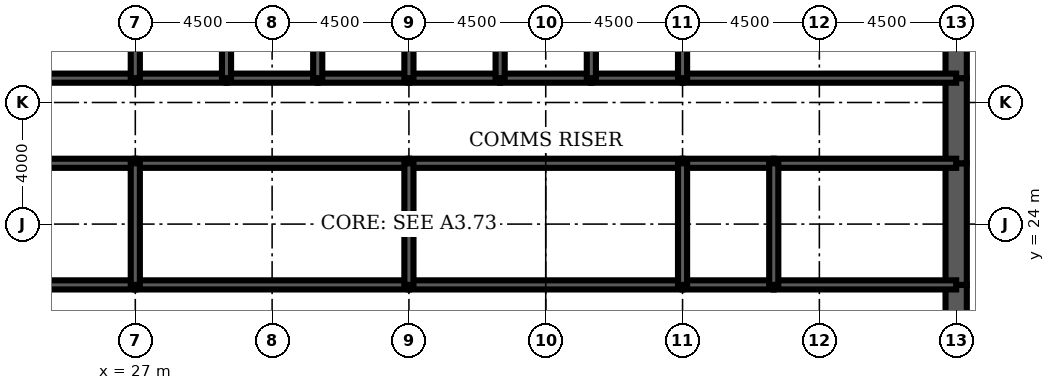
"""IFC4 building model, lengths in metres.
Left out: names, types, materials, properties, quantities, classifications, styles, units other than length and angle.
Written with IfcOpenShell. Run it as: python <this file> out.ifc"""

import sys

from ifc_helpers import new_model, si_unit, direction, frame, frame_2d, origin, place, context, subcontext, project, spatial, rectangle, extrude, element, fill, save


model = new_model("IFC4")
c1 = context("Model", 3, precision=1e-05, world=origin(), true_north=direction((0.0, 1.0)))
c2 = subcontext(c1, "Body", "Model", "MODEL_VIEW")
j1 = project(units=[si_unit("LENGTHUNIT", "METRE"), si_unit("PLANEANGLEUNIT", "RADIAN")], contexts=[c1])
p1 = place(None, origin())
s1 = spatial("IfcSite", under=j1, at=p1, CompositionType="ELEMENT")
p2 = place(p1, origin())
s2 = spatial("IfcBuilding", under=s1, at=p2, CompositionType="ELEMENT")
p3 = place(p2, frame((0.0, 0.0, 313.1)))
s3 = spatial("IfcBuildingStorey", under=s2, at=p3, CompositionType="ELEMENT", Elevation=313.1)
p4 = place(p3, frame((54.0, 19.2, 0.0), z_axis=(0.0, 0.0, 1.0), x_axis=(0.0, 1.0, 0.0)))
e1 = element("IfcWall", 1, at=p4, inside=s3, PredefinedType="SHEAR", context=c2, shape_type="SweptSolid", body=[
    extrude(rectangle(XDim=2.8, YDim=0.7, at=frame_2d((1.4, 0.0))), origin(), (0.0, 0.0, 1.0), 4.2),
])
p5 = place(p4, frame((0.4, 0.0, 0.0)))
e2 = element("IfcOpeningElement", 2, at=p5, cuts=e1, PredefinedType="OPENING", context=c2, shape_type="SweptSolid", body=[
    extrude(rectangle(XDim=1.8, YDim=2.1, at=frame_2d((0.9, 1.05))), frame((0.0, 0.36, 0.0), z_axis=(0.0, -1.0, 0.0), x_axis=(1.0, 0.0, 0.0)), (0.0, 0.0, 1.0), 0.72),
])
p6 = place(p3, frame((54.0, 22.0, 0.0), z_axis=(0.0, 0.0, 1.0), x_axis=(0.0, 1.0, 0.0)))
e3 = element("IfcWall", 3, at=p6, inside=s3, PredefinedType="SHEAR", context=c2, shape_type="SweptSolid", body=[
    extrude(rectangle(XDim=4.0, YDim=0.7, at=frame_2d((2.0, 0.0))), origin(), (0.0, 0.0, 1.0), 4.2),
])
p7 = place(p3, frame((54.0, 26.0, 0.0), z_axis=(0.0, 0.0, 1.0), x_axis=(0.0, 1.0, 0.0)))
e4 = element("IfcWall", 4, at=p7, inside=s3, PredefinedType="SHEAR", context=c2, shape_type="SweptSolid", body=[
    extrude(rectangle(XDim=2.8, YDim=0.7, at=frame_2d((1.4, 0.0))), origin(), (0.0, 0.0, 1.0), 4.2),
])
p8 = place(p7, frame((0.6, 0.0, 0.0)))
e5 = element("IfcOpeningElement", 5, at=p8, cuts=e4, PredefinedType="OPENING", context=c2, shape_type="SweptSolid", body=[
    extrude(rectangle(XDim=1.8, YDim=2.1, at=frame_2d((0.9, 1.05))), frame((0.0, 0.36, 0.0), z_axis=(0.0, -1.0, 0.0), x_axis=(1.0, 0.0, 0.0)), (0.0, 0.0, 1.0), 0.72),
])
p9 = place(p3, frame((54.0, 28.8, 0.0), z_axis=(0.0, 0.0, 1.0), x_axis=(0.0, 1.0, 0.0)))
e6 = element("IfcWall", 6, at=p9, inside=s3, PredefinedType="SHEAR", context=c2, shape_type="SweptSolid", body=[
    extrude(rectangle(XDim=3.2, YDim=0.7, at=frame_2d((1.6, 0.0))), origin(), (0.0, 0.0, 1.0), 4.2),
])
p10 = place(p3, frame((18.0, 28.8, 0.0), z_axis=(0.0, 0.0, 1.0), x_axis=(1.0, 0.0, 0.0)))
e7 = element("IfcWall", 7, at=p10, inside=s3, PredefinedType="SOLIDWALL", context=c2, shape_type="SweptSolid", body=[
    extrude(rectangle(XDim=9.0, YDim=0.3, at=frame_2d((4.5, 0.0))), origin(), (0.0, 0.0, 1.0), 4.2),
])
p11 = place(p10, frame((0.65, 0.0, 0.0)))
e8 = element("IfcOpeningElement", 8, at=p11, cuts=e7, PredefinedType="OPENING", context=c2, shape_type="SweptSolid", body=[
    extrude(rectangle(XDim=1.0, YDim=2.1, at=frame_2d((0.5, 1.05))), frame((0.0, 0.16, 0.0), z_axis=(0.0, -1.0, 0.0), x_axis=(1.0, 0.0, 0.0)), (0.0, 0.0, 1.0), 0.32),
])
p12 = place(p3, frame((27.0, 28.8, 0.0), z_axis=(0.0, 0.0, 1.0), x_axis=(1.0, 0.0, 0.0)))
e9 = element("IfcWall", 9, at=p12, inside=s3, PredefinedType="SOLIDWALL", context=c2, shape_type="SweptSolid", body=[
    extrude(rectangle(XDim=3.0, YDim=0.3, at=frame_2d((1.5, 0.0))), origin(), (0.0, 0.0, 1.0), 4.2),
])
p13 = place(p12, frame((0.95, 0.0, 0.0)))
e10 = element("IfcOpeningElement", 10, at=p13, cuts=e9, PredefinedType="OPENING", context=c2, shape_type="SweptSolid", body=[
    extrude(rectangle(XDim=1.1, YDim=2.2, at=frame_2d((0.55, 1.1))), frame((0.0, 0.16, 0.0), z_axis=(0.0, -1.0, 0.0), x_axis=(1.0, 0.0, 0.0)), (0.0, 0.0, 1.0), 0.32),
])
p14 = place(p3, frame((30.0, 28.8, 0.0), z_axis=(0.0, 0.0, 1.0), x_axis=(1.0, 0.0, 0.0)))
e11 = element("IfcWall", 11, at=p14, inside=s3, PredefinedType="SOLIDWALL", context=c2, shape_type="SweptSolid", body=[
    extrude(rectangle(XDim=3.0, YDim=0.3, at=frame_2d((1.5, 0.0))), origin(), (0.0, 0.0, 1.0), 4.2),
])
p15 = place(p14, frame((0.95, 0.0, 0.0)))
e12 = element("IfcOpeningElement", 12, at=p15, cuts=e11, PredefinedType="OPENING", context=c2, shape_type="SweptSolid", body=[
    extrude(rectangle(XDim=1.1, YDim=2.2, at=frame_2d((0.55, 1.1))), frame((0.0, 0.16, 0.0), z_axis=(0.0, -1.0, 0.0), x_axis=(1.0, 0.0, 0.0)), (0.0, 0.0, 1.0), 0.32),
])
p16 = place(p3, frame((33.0, 28.8, 0.0), z_axis=(0.0, 0.0, 1.0), x_axis=(1.0, 0.0, 0.0)))
e13 = element("IfcWall", 13, at=p16, inside=s3, PredefinedType="SOLIDWALL", context=c2, shape_type="SweptSolid", body=[
    extrude(rectangle(XDim=3.0, YDim=0.3, at=frame_2d((1.5, 0.0))), origin(), (0.0, 0.0, 1.0), 4.2),
])
p17 = place(p16, frame((0.95, 0.0, 0.0)))
e14 = element("IfcOpeningElement", 14, at=p17, cuts=e13, PredefinedType="OPENING", context=c2, shape_type="SweptSolid", body=[
    extrude(rectangle(XDim=1.1, YDim=2.2, at=frame_2d((0.55, 1.1))), frame((0.0, 0.16, 0.0), z_axis=(0.0, -1.0, 0.0), x_axis=(1.0, 0.0, 0.0)), (0.0, 0.0, 1.0), 0.32),
])
p18 = place(p3, frame((36.0, 28.8, 0.0), z_axis=(0.0, 0.0, 1.0), x_axis=(1.0, 0.0, 0.0)))
e15 = element("IfcWall", 15, at=p18, inside=s3, PredefinedType="SOLIDWALL", context=c2, shape_type="SweptSolid", body=[
    extrude(rectangle(XDim=3.0, YDim=0.3, at=frame_2d((1.5, 0.0))), origin(), (0.0, 0.0, 1.0), 4.2),
])
p19 = place(p18, frame((1.0, 0.0, 0.0)))
e16 = element("IfcOpeningElement", 16, at=p19, cuts=e15, PredefinedType="OPENING", context=c2, shape_type="SweptSolid", body=[
    extrude(rectangle(XDim=1.0, YDim=2.1, at=frame_2d((0.5, 1.05))), frame((0.0, 0.16, 0.0), z_axis=(0.0, -1.0, 0.0), x_axis=(1.0, 0.0, 0.0)), (0.0, 0.0, 1.0), 0.32),
])
p20 = place(p3, frame((39.0, 28.8, 0.0), z_axis=(0.0, 0.0, 1.0), x_axis=(1.0, 0.0, 0.0)))
e17 = element("IfcWall", 17, at=p20, inside=s3, PredefinedType="SOLIDWALL", context=c2, shape_type="SweptSolid", body=[
    extrude(rectangle(XDim=3.0, YDim=0.3, at=frame_2d((1.5, 0.0))), origin(), (0.0, 0.0, 1.0), 4.2),
])
p21 = place(p20, frame((1.0, 0.0, 0.0)))
e18 = element("IfcOpeningElement", 18, at=p21, cuts=e17, PredefinedType="OPENING", context=c2, shape_type="SweptSolid", body=[
    extrude(rectangle(XDim=1.0, YDim=2.1, at=frame_2d((0.5, 1.05))), frame((0.0, 0.16, 0.0), z_axis=(0.0, -1.0, 0.0), x_axis=(1.0, 0.0, 0.0)), (0.0, 0.0, 1.0), 0.32),
])
p22 = place(p3, frame((42.0, 28.8, 0.0), z_axis=(0.0, 0.0, 1.0), x_axis=(1.0, 0.0, 0.0)))
e19 = element("IfcWall", 19, at=p22, inside=s3, PredefinedType="SOLIDWALL", context=c2, shape_type="SweptSolid", body=[
    extrude(rectangle(XDim=3.0, YDim=0.3, at=frame_2d((1.5, 0.0))), origin(), (0.0, 0.0, 1.0), 4.2),
])
p23 = place(p22, frame((0.95, 0.0, 0.0)))
e20 = element("IfcOpeningElement", 20, at=p23, cuts=e19, PredefinedType="OPENING", context=c2, shape_type="SweptSolid", body=[
    extrude(rectangle(XDim=1.1, YDim=2.2, at=frame_2d((0.55, 1.1))), frame((0.0, 0.16, 0.0), z_axis=(0.0, -1.0, 0.0), x_axis=(1.0, 0.0, 0.0)), (0.0, 0.0, 1.0), 0.32),
])
p24 = place(p3, frame((45.0, 28.8, 0.0), z_axis=(0.0, 0.0, 1.0), x_axis=(1.0, 0.0, 0.0)))
e21 = element("IfcWall", 21, at=p24, inside=s3, PredefinedType="SOLIDWALL", context=c2, shape_type="SweptSolid", body=[
    extrude(rectangle(XDim=9.0, YDim=0.3, at=frame_2d((4.5, 0.0))), origin(), (0.0, 0.0, 1.0), 4.2),
])
p25 = place(p24, frame((7.35, 0.0, 0.0)))
e22 = element("IfcOpeningElement", 22, at=p25, cuts=e21, PredefinedType="OPENING", context=c2, shape_type="SweptSolid", body=[
    extrude(rectangle(XDim=1.0, YDim=2.1, at=frame_2d((0.5, 1.05))), frame((0.0, 0.16, 0.0), z_axis=(0.0, -1.0, 0.0), x_axis=(1.0, 0.0, 0.0)), (0.0, 0.0, 1.0), 0.32),
])
p26 = place(p3, frame((24.0, 22.0, 0.0), z_axis=(0.0, 0.0, 1.0), x_axis=(1.0, 0.0, 0.0)))
e23 = element("IfcWall", 23, at=p26, inside=s3, PredefinedType="SOLIDWALL", context=c2, shape_type="SweptSolid", body=[
    extrude(rectangle(XDim=3.0, YDim=0.3, at=frame_2d((1.5, 0.0))), origin(), (0.0, 0.0, 1.0), 4.2),
])
p27 = place(p26, frame((1.0, 0.0, 0.0)))
e24 = element("IfcOpeningElement", 24, at=p27, cuts=e23, PredefinedType="OPENING", context=c2, shape_type="SweptSolid", body=[
    extrude(rectangle(XDim=1.0, YDim=2.1, at=frame_2d((0.5, 1.05))), frame((0.0, 0.16, 0.0), z_axis=(0.0, -1.0, 0.0), x_axis=(1.0, 0.0, 0.0)), (0.0, 0.0, 1.0), 0.32),
])
p28 = place(p3, frame((27.0, 22.0, 0.0), z_axis=(0.0, 0.0, 1.0), x_axis=(1.0, 0.0, 0.0)))
e25 = element("IfcWall", 25, at=p28, inside=s3, PredefinedType="SOLIDWALL", context=c2, shape_type="SweptSolid", body=[
    extrude(rectangle(XDim=9.0, YDim=0.3, at=frame_2d((4.5, 0.0))), origin(), (0.0, 0.0, 1.0), 4.2),
])
p29 = place(p28, frame((4.0, 0.0, 0.0)))
e26 = element("IfcOpeningElement", 26, at=p29, cuts=e25, PredefinedType="OPENING", context=c2, shape_type="SweptSolid", body=[
    extrude(rectangle(XDim=1.0, YDim=2.1, at=frame_2d((0.5, 1.05))), frame((0.0, 0.16, 0.0), z_axis=(0.0, -1.0, 0.0), x_axis=(1.0, 0.0, 0.0)), (0.0, 0.0, 1.0), 0.32),
])
p30 = place(p3, frame((36.0, 22.0, 0.0), z_axis=(0.0, 0.0, 1.0), x_axis=(1.0, 0.0, 0.0)))
e27 = element("IfcWall", 27, at=p30, inside=s3, PredefinedType="SOLIDWALL", context=c2, shape_type="SweptSolid", body=[
    extrude(rectangle(XDim=9.0, YDim=0.3, at=frame_2d((4.5, 0.0))), origin(), (0.0, 0.0, 1.0), 4.2),
])
p31 = place(p30, frame((4.0, 0.0, 0.0)))
e28 = element("IfcOpeningElement", 28, at=p31, cuts=e27, PredefinedType="OPENING", context=c2, shape_type="SweptSolid", body=[
    extrude(rectangle(XDim=1.0, YDim=2.1, at=frame_2d((0.5, 1.05))), frame((0.0, 0.16, 0.0), z_axis=(0.0, -1.0, 0.0), x_axis=(1.0, 0.0, 0.0)), (0.0, 0.0, 1.0), 0.32),
])
p32 = place(p3, frame((45.0, 22.0, 0.0), z_axis=(0.0, 0.0, 1.0), x_axis=(1.0, 0.0, 0.0)))
e29 = element("IfcWall", 29, at=p32, inside=s3, PredefinedType="SOLIDWALL", context=c2, shape_type="SweptSolid", body=[
    extrude(rectangle(XDim=3.0, YDim=0.3, at=frame_2d((1.5, 0.0))), origin(), (0.0, 0.0, 1.0), 4.2),
])
p33 = place(p32, frame((1.0, 0.0, 0.0)))
e30 = element("IfcOpeningElement", 30, at=p33, cuts=e29, PredefinedType="OPENING", context=c2, shape_type="SweptSolid", body=[
    extrude(rectangle(XDim=1.0, YDim=2.1, at=frame_2d((0.5, 1.05))), frame((0.0, 0.16, 0.0), z_axis=(0.0, -1.0, 0.0), x_axis=(1.0, 0.0, 0.0)), (0.0, 0.0, 1.0), 0.32),
])
p34 = place(p3, frame((48.0, 22.0, 0.0), z_axis=(0.0, 0.0, 1.0), x_axis=(1.0, 0.0, 0.0)))
e31 = element("IfcWall", 31, at=p34, inside=s3, PredefinedType="SOLIDWALL", context=c2, shape_type="SweptSolid", body=[
    extrude(rectangle(XDim=6.0, YDim=0.3, at=frame_2d((3.0, 0.0))), origin(), (0.0, 0.0, 1.0), 4.2),
])
p35 = place(p34, frame((2.0, 0.0, 0.0)))
e32 = element("IfcOpeningElement", 32, at=p35, cuts=e31, PredefinedType="OPENING", context=c2, shape_type="SweptSolid", body=[
    extrude(rectangle(XDim=1.0, YDim=2.1, at=frame_2d((0.5, 1.05))), frame((0.0, 0.16, 0.0), z_axis=(0.0, -1.0, 0.0), x_axis=(1.0, 0.0, 0.0)), (0.0, 0.0, 1.0), 0.32),
])
p36 = place(p34, frame((4.25, 0.0, 0.0)))
e33 = element("IfcOpeningElement", 33, at=p36, cuts=e31, PredefinedType="OPENING", context=c2, shape_type="SweptSolid", body=[
    extrude(rectangle(XDim=1.0, YDim=2.1, at=frame_2d((0.5, 1.05))), frame((0.0, 0.16, 0.0), z_axis=(0.0, -1.0, 0.0), x_axis=(1.0, 0.0, 0.0)), (0.0, 0.0, 1.0), 0.32),
])
p37 = place(p3, frame((24.0, 26.0, 0.0), z_axis=(0.0, 0.0, 1.0), x_axis=(1.0, 0.0, 0.0)))
e34 = element("IfcWall", 34, at=p37, inside=s3, PredefinedType="SOLIDWALL", context=c2, shape_type="SweptSolid", body=[
    extrude(rectangle(XDim=3.0, YDim=0.3, at=frame_2d((1.5, 0.0))), origin(), (0.0, 0.0, 1.0), 4.2),
])
for number, where, z_axis, x_axis in (
    (35, (27.0, 26.0, 0.0), (0.0, 0.0, 1.0), (1.0, 0.0, 0.0)),
    (36, (36.0, 26.0, 0.0), (0.0, 0.0, 1.0), (1.0, 0.0, 0.0)),
):
    element("IfcWall", number, at=place(p3, frame(where, z_axis=z_axis, x_axis=x_axis)), inside=s3, PredefinedType="SOLIDWALL", context=c2, shape_type="SweptSolid", body=[
        extrude(rectangle(XDim=9.0, YDim=0.3, at=frame_2d((4.5, 0.0))), origin(), (0.0, 0.0, 1.0), 4.2),
    ])
p38 = place(p3, frame((45.0, 26.0, 0.0), z_axis=(0.0, 0.0, 1.0), x_axis=(1.0, 0.0, 0.0)))
e37 = element("IfcWall", 37, at=p38, inside=s3, PredefinedType="SOLIDWALL", context=c2, shape_type="SweptSolid", body=[
    extrude(rectangle(XDim=3.0, YDim=0.3, at=frame_2d((1.5, 0.0))), origin(), (0.0, 0.0, 1.0), 4.2),
])
p39 = place(p3, frame((48.0, 26.0, 0.0), z_axis=(0.0, 0.0, 1.0), x_axis=(1.0, 0.0, 0.0)))
e38 = element("IfcWall", 38, at=p39, inside=s3, PredefinedType="SOLIDWALL", context=c2, shape_type="SweptSolid", body=[
    extrude(rectangle(XDim=6.0, YDim=0.3, at=frame_2d((3.0, 0.0))), origin(), (0.0, 0.0, 1.0), 4.2),
])
for number, where, z_axis, x_axis in (
    (39, (27.0, 28.8, 0.0), (0.0, 0.0, 1.0), (0.0, 1.0, 0.0)),
    (40, (30.0, 28.8, 0.0), (0.0, 0.0, 1.0), (0.0, 1.0, 0.0)),
    (41, (33.0, 28.8, 0.0), (0.0, 0.0, 1.0), (0.0, 1.0, 0.0)),
    (42, (36.0, 28.8, 0.0), (0.0, 0.0, 1.0), (0.0, 1.0, 0.0)),
    (43, (39.0, 28.8, 0.0), (0.0, 0.0, 1.0), (0.0, 1.0, 0.0)),
    (44, (42.0, 28.8, 0.0), (0.0, 0.0, 1.0), (0.0, 1.0, 0.0)),
    (45, (45.0, 28.8, 0.0), (0.0, 0.0, 1.0), (0.0, 1.0, 0.0)),
):
    element("IfcWall", number, at=place(p3, frame(where, z_axis=z_axis, x_axis=x_axis)), inside=s3, PredefinedType="SOLIDWALL", context=c2, shape_type="SweptSolid", body=[
        extrude(rectangle(XDim=3.2, YDim=0.3, at=frame_2d((1.6, 0.0))), origin(), (0.0, 0.0, 1.0), 4.2),
    ])
for number, where, z_axis, x_axis in (
    (46, (27.0, 22.0, 0.0), (0.0, 0.0, 1.0), (0.0, 1.0, 0.0)),
    (47, (36.0, 22.0, 0.0), (0.0, 0.0, 1.0), (0.0, 1.0, 0.0)),
    (48, (45.0, 22.0, 0.0), (0.0, 0.0, 1.0), (0.0, 1.0, 0.0)),
    (49, (48.0, 22.0, 0.0), (0.0, 0.0, 1.0), (0.0, 1.0, 0.0)),
):
    element("IfcWall", number, at=place(p3, frame(where, z_axis=z_axis, x_axis=x_axis)), inside=s3, PredefinedType="SOLIDWALL", context=c2, shape_type="SweptSolid", body=[
        extrude(rectangle(XDim=4.0, YDim=0.3, at=frame_2d((2.0, 0.0))), origin(), (0.0, 0.0, 1.0), 4.2),
    ])
p40 = place(p3, frame((51.775, 22.15, 0.0), z_axis=(0.0, 0.0, 1.0), x_axis=(0.0, 1.0, 0.0)))
e50 = element("IfcWall", 50, at=p40, inside=s3, PredefinedType="PARTITIONING", context=c2, shape_type="SweptSolid", body=[
    extrude(rectangle(XDim=3.7, YDim=0.15, at=frame_2d((1.85, 0.0))), origin(), (0.0, 0.0, 1.0), 3.0),
])
p41 = place(p3, frame((25.2, 26.15, 0.0), z_axis=(0.0, 0.0, 1.0), x_axis=(0.0, 1.0, 0.0)))
e51 = element("IfcWall", 51, at=p41, inside=s3, PredefinedType="PARTITIONING", context=c2, shape_type="SweptSolid", body=[
    extrude(rectangle(XDim=2.5, YDim=0.15, at=frame_2d((1.25, 0.0))), origin(), (0.0, 0.0, 1.0), 3.0),
])
p42 = place(p41, frame((0.35, 0.0, 0.0)))
e52 = element("IfcOpeningElement", 52, at=p42, cuts=e51, PredefinedType="OPENING", context=c2, shape_type="SweptSolid", body=[
    extrude(rectangle(XDim=1.0, YDim=2.1, at=frame_2d((0.5, 1.05))), frame((0.0, 0.085, 0.0), z_axis=(0.0, -1.0, 0.0), x_axis=(1.0, 0.0, 0.0)), (0.0, 0.0, 1.0), 0.17),
])
p43 = place(p42, origin())
e53 = element("IfcDoor", 53, at=p43, inside=s3, OperationType="SINGLE_SWING_LEFT", PredefinedType="DOOR", context=c2, shape_type="SweptSolid", body=[
    extrude(rectangle(XDim=1.0, YDim=2.1, at=frame_2d((0.5, 1.05))), frame((0.0, 0.025, 0.0), z_axis=(0.0, -1.0, 0.0), x_axis=(1.0, 0.0, 0.0)), (0.0, 0.0, 1.0), 0.05),
])
fill(e52, e53)
p44 = place(p23, origin())
e54 = element("IfcDoor", 54, at=p44, inside=s3, OperationType="DOUBLE_DOOR_SLIDING", PredefinedType="USERDEFINED", context=c2, shape_type="SweptSolid", body=[
    extrude(rectangle(XDim=1.1, YDim=2.2, at=frame_2d((0.55, 1.1))), frame((0.0, 0.025, 0.0), z_axis=(0.0, -1.0, 0.0), x_axis=(1.0, 0.0, 0.0)), (0.0, 0.0, 1.0), 0.05),
])
fill(e20, e54)
p45 = place(p13, origin())
e55 = element("IfcDoor", 55, at=p45, inside=s3, OperationType="DOUBLE_DOOR_SLIDING", PredefinedType="USERDEFINED", context=c2, shape_type="SweptSolid", body=[
    extrude(rectangle(XDim=1.1, YDim=2.2, at=frame_2d((0.55, 1.1))), frame((0.0, 0.025, 0.0), z_axis=(0.0, -1.0, 0.0), x_axis=(1.0, 0.0, 0.0)), (0.0, 0.0, 1.0), 0.05),
])
fill(e10, e55)
p46 = place(p15, origin())
e56 = element("IfcDoor", 56, at=p46, inside=s3, OperationType="DOUBLE_DOOR_SLIDING", PredefinedType="USERDEFINED", context=c2, shape_type="SweptSolid", body=[
    extrude(rectangle(XDim=1.1, YDim=2.2, at=frame_2d((0.55, 1.1))), frame((0.0, 0.025, 0.0), z_axis=(0.0, -1.0, 0.0), x_axis=(1.0, 0.0, 0.0)), (0.0, 0.0, 1.0), 0.05),
])
fill(e12, e56)
p47 = place(p17, origin())
e57 = element("IfcDoor", 57, at=p47, inside=s3, OperationType="DOUBLE_DOOR_SLIDING", PredefinedType="USERDEFINED", context=c2, shape_type="SweptSolid", body=[
    extrude(rectangle(XDim=1.1, YDim=2.2, at=frame_2d((0.55, 1.1))), frame((0.0, 0.025, 0.0), z_axis=(0.0, -1.0, 0.0), x_axis=(1.0, 0.0, 0.0)), (0.0, 0.0, 1.0), 0.05),
])
fill(e14, e57)
p48 = place(p25, origin())
e58 = element("IfcDoor", 58, at=p48, inside=s3, OperationType="SINGLE_SWING_RIGHT", PredefinedType="DOOR", context=c2, shape_type="SweptSolid", body=[
    extrude(rectangle(XDim=1.0, YDim=2.1, at=frame_2d((0.5, 1.05))), frame((0.0, 0.025, 0.0), z_axis=(0.0, -1.0, 0.0), x_axis=(1.0, 0.0, 0.0)), (0.0, 0.0, 1.0), 0.05),
])
fill(e22, e58)
p49 = place(p5, origin())
e59 = element("IfcDoor", 59, at=p49, inside=s3, OperationType="SINGLE_SWING_LEFT", PredefinedType="DOOR", context=c2, shape_type="SweptSolid", body=[
    extrude(rectangle(XDim=1.8, YDim=2.1, at=frame_2d((0.9, 1.05))), frame((0.0, 0.35, 0.0), z_axis=(0.0, -1.0, 0.0), x_axis=(1.0, 0.0, 0.0)), (0.0, 0.0, 1.0), 0.699),
])
fill(e2, e59)
p50 = place(p8, origin())
e60 = element("IfcDoor", 60, at=p50, inside=s3, OperationType="SINGLE_SWING_LEFT", PredefinedType="DOOR", context=c2, shape_type="SweptSolid", body=[
    extrude(rectangle(XDim=1.8, YDim=2.1, at=frame_2d((0.9, 1.05))), frame((0.0, 0.35, 0.0), z_axis=(0.0, -1.0, 0.0), x_axis=(1.0, 0.0, 0.0)), (0.0, 0.0, 1.0), 0.699),
])
fill(e5, e60)
p51 = place(p27, origin())
e61 = element("IfcDoor", 61, at=p51, inside=s3, OperationType="SINGLE_SWING_LEFT", PredefinedType="DOOR", context=c2, shape_type="SweptSolid", body=[
    extrude(rectangle(XDim=1.0, YDim=2.1, at=frame_2d((0.5, 1.05))), frame((0.0, 0.025, 0.0), z_axis=(0.0, -1.0, 0.0), x_axis=(1.0, 0.0, 0.0)), (0.0, 0.0, 1.0), 0.05),
])
fill(e24, e61)
p52 = place(p29, origin())
e62 = element("IfcDoor", 62, at=p52, inside=s3, OperationType="SINGLE_SWING_LEFT", PredefinedType="DOOR", context=c2, shape_type="SweptSolid", body=[
    extrude(rectangle(XDim=1.0, YDim=2.1, at=frame_2d((0.5, 1.05))), frame((0.0, 0.025, 0.0), z_axis=(0.0, -1.0, 0.0), x_axis=(1.0, 0.0, 0.0)), (0.0, 0.0, 1.0), 0.05),
])
fill(e26, e62)
p53 = place(p31, origin())
e63 = element("IfcDoor", 63, at=p53, inside=s3, OperationType="SINGLE_SWING_LEFT", PredefinedType="DOOR", context=c2, shape_type="SweptSolid", body=[
    extrude(rectangle(XDim=1.0, YDim=2.1, at=frame_2d((0.5, 1.05))), frame((0.0, 0.025, 0.0), z_axis=(0.0, -1.0, 0.0), x_axis=(1.0, 0.0, 0.0)), (0.0, 0.0, 1.0), 0.05),
])
fill(e28, e63)
p54 = place(p33, origin())
e64 = element("IfcDoor", 64, at=p54, inside=s3, OperationType="SINGLE_SWING_LEFT", PredefinedType="DOOR", context=c2, shape_type="SweptSolid", body=[
    extrude(rectangle(XDim=1.0, YDim=2.1, at=frame_2d((0.5, 1.05))), frame((0.0, 0.025, 0.0), z_axis=(0.0, -1.0, 0.0), x_axis=(1.0, 0.0, 0.0)), (0.0, 0.0, 1.0), 0.05),
])
fill(e30, e64)
p55 = place(p35, origin())
e65 = element("IfcDoor", 65, at=p55, inside=s3, OperationType="SINGLE_SWING_LEFT", PredefinedType="DOOR", context=c2, shape_type="SweptSolid", body=[
    extrude(rectangle(XDim=1.0, YDim=2.1, at=frame_2d((0.5, 1.05))), frame((0.0, 0.025, 0.0), z_axis=(0.0, -1.0, 0.0), x_axis=(1.0, 0.0, 0.0)), (0.0, 0.0, 1.0), 0.05),
])
fill(e32, e65)
p56 = place(p36, origin())
e66 = element("IfcDoor", 66, at=p56, inside=s3, OperationType="SINGLE_SWING_RIGHT", PredefinedType="DOOR", context=c2, shape_type="SweptSolid", body=[
    extrude(rectangle(XDim=1.0, YDim=2.1, at=frame_2d((0.5, 1.05))), frame((0.0, 0.025, 0.0), z_axis=(0.0, -1.0, 0.0), x_axis=(1.0, 0.0, 0.0)), (0.0, 0.0, 1.0), 0.05),
])
fill(e33, e66)
p57 = place(p19, origin())
e67 = element("IfcDoor", 67, at=p57, inside=s3, OperationType="SINGLE_SWING_LEFT", PredefinedType="DOOR", context=c2, shape_type="SweptSolid", body=[
    extrude(rectangle(XDim=1.0, YDim=2.1, at=frame_2d((0.5, 1.05))), frame((0.0, 0.025, 0.0), z_axis=(0.0, -1.0, 0.0), x_axis=(1.0, 0.0, 0.0)), (0.0, 0.0, 1.0), 0.05),
])
fill(e16, e67)
p58 = place(p21, origin())
e68 = element("IfcDoor", 68, at=p58, inside=s3, OperationType="SINGLE_SWING_LEFT", PredefinedType="DOOR", context=c2, shape_type="SweptSolid", body=[
    extrude(rectangle(XDim=1.0, YDim=2.1, at=frame_2d((0.5, 1.05))), frame((0.0, 0.025, 0.0), z_axis=(0.0, -1.0, 0.0), x_axis=(1.0, 0.0, 0.0)), (0.0, 0.0, 1.0), 0.05),
])
fill(e18, e68)
save(model, sys.argv[1])
